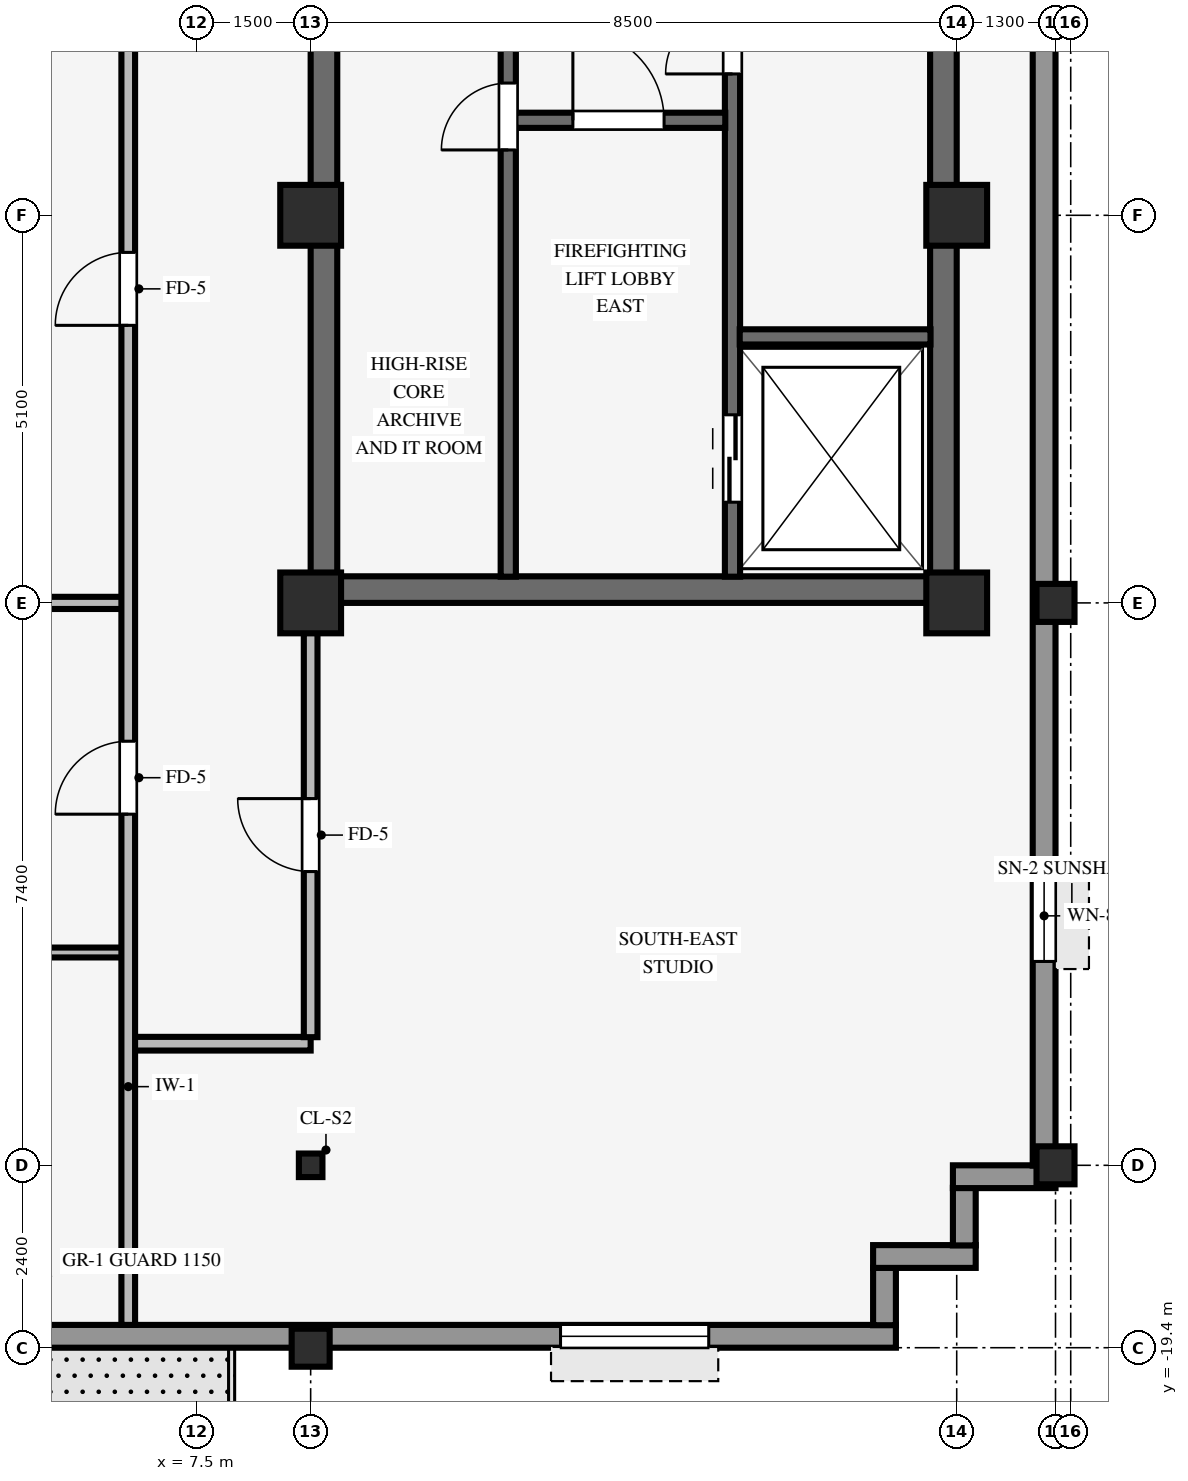
"""IFC4 building model, lengths in metres.
Left out: names, types, materials, properties, quantities, classifications, styles, units other than length and angle.
Written with IfcOpenShell. Run it as: python <this file> out.ifc"""

import sys

from ifc_helpers import new_model, si_unit, direction, frame, frame_2d, origin, origin_2d, place, context, subcontext, project, spatial, rectangle, hollow_rectangle, i_section, extrude, source, transform, mapped, element, fill, save


model = new_model("IFC4")
c1 = context("Model", 3, precision=1e-05, world=origin(), true_north=direction((0.0, 1.0)))
c2 = subcontext(c1, "Body", "Model", "MODEL_VIEW")
j1 = project(units=[si_unit("LENGTHUNIT", "METRE"), si_unit("PLANEANGLEUNIT", "RADIAN")], contexts=[c1])
p1 = place(None, origin())
s1 = spatial("IfcSite", under=j1, at=p1, CompositionType="ELEMENT")
p2 = place(p1, origin())
s2 = spatial("IfcBuilding", under=s1, at=p2, CompositionType="ELEMENT")
p3 = place(p2, frame((0.0, 0.0, 231.05)))
s3 = spatial("IfcBuildingStorey", under=s2, at=p3, CompositionType="ELEMENT", Elevation=231.05)
p4 = place(p3, frame((9.0, -9.425, 0.0), z_axis=(0.0, 0.0, 1.0), x_axis=(1.0, 0.0, 0.0)))
e1 = element("IfcWall", 1, at=p4, inside=s3, PredefinedType="SHEAR", context=c2, shape_type="SweptSolid", body=[
    extrude(rectangle(XDim=8.5, YDim=0.35, at=frame_2d((4.25, 0.0))), origin(), (0.0, 0.0, 1.0), 3.37),
])
p5 = place(p3, frame((9.175, -9.255, 0.0), z_axis=(0.0, 0.0, 1.0), x_axis=(0.0, 1.0, 0.0)))
e2 = element("IfcWall", 2, at=p5, inside=s3, PredefinedType="SHEAR", context=c2, shape_type="SweptSolid", body=[
    extrude(rectangle(XDim=18.51, YDim=0.35, at=frame_2d((9.255, 0.0))), origin(), (0.0, 0.0, 1.0), 3.37),
])
p6 = place(p5, frame((8.655, 0.0, 0.0)))
e3 = element("IfcOpeningElement", 3, at=p6, cuts=e2, PredefinedType="OPENING", context=c2, shape_type="SweptSolid", body=[
    extrude(rectangle(XDim=1.2, YDim=2.15, at=frame_2d((0.6, 1.075))), frame((0.0, 0.185, 0.0), z_axis=(0.0, -1.0, 0.0), x_axis=(1.0, 0.0, 0.0)), (0.0, 0.0, 1.0), 0.37),
])
p7 = place(p3, frame((17.325, -9.255, 0.0), z_axis=(0.0, 0.0, 1.0), x_axis=(0.0, 1.0, 0.0)))
e4 = element("IfcWall", 4, at=p7, inside=s3, PredefinedType="SHEAR", context=c2, shape_type="SweptSolid", body=[
    extrude(rectangle(XDim=18.51, YDim=0.35, at=frame_2d((9.255, 0.0))), origin(), (0.0, 0.0, 1.0), 3.37),
])
for number, where, z_axis, x_axis in (
    (5, (9.0, -9.6, 0.0), (0.0, 0.0, 1.0), (1.0, 0.0, 0.0)),
    (6, (9.0, -4.5, 0.0), (0.0, 0.0, 1.0), (1.0, 0.0, 0.0)),
    (7, (17.5, -9.6, 0.0), (0.0, 0.0, 1.0), (1.0, 0.0, 0.0)),
    (8, (17.5, -4.5, 0.0), (0.0, 0.0, 1.0), (1.0, 0.0, 0.0)),
):
    element("IfcColumn", number, at=place(p3, frame(where, z_axis=z_axis, x_axis=x_axis)), inside=s3, PredefinedType="COLUMN", context=c2, shape_type="SweptSolid", body=[
        extrude(rectangle(XDim=0.8, YDim=0.8, at=origin_2d()), origin(), (0.0, 0.0, 1.0), 3.37),
    ])
for number, where, z_axis, x_axis in (
    (9, (18.8, -17.0, 0.0), (0.0, 0.0, 1.0), (1.0, 0.0, 0.0)),
    (10, (18.8, -9.6, 0.0), (0.0, 0.0, 1.0), (1.0, 0.0, 0.0)),
    (11, (9.0, -19.4, 0.0), (0.0, 0.0, 1.0), (1.0, 0.0, 0.0)),
):
    element("IfcColumn", number, at=place(p3, frame(where, z_axis=z_axis, x_axis=x_axis)), inside=s3, PredefinedType="COLUMN", context=c2, shape_type="SweptSolid", body=[
        extrude(hollow_rectangle(XDim=0.5, YDim=0.5, WallThickness=0.032, InnerFilletRadius=0.032, OuterFilletRadius=0.064, at=origin_2d()), origin(), (0.0, 0.0, 1.0), 3.37),
    ])
p8 = place(p3, frame((9.0, -17.0, 0.0), z_axis=(0.0, 0.0, 1.0), x_axis=(1.0, 0.0, 0.0)))
e12 = element("IfcColumn", 12, at=p8, inside=s3, PredefinedType="COLUMN", context=c2, shape_type="SweptSolid", body=[
    extrude(i_section(OverallWidth=0.31, OverallDepth=0.31, WebThickness=0.015, FlangeThickness=0.015, FilletRadius=0.015, at=origin_2d()), origin(), (0.0, 0.0, 1.0), 3.37),
])
p9 = place(p3, frame((-24.3, -19.25, 0.0), z_axis=(0.0, 0.0, 1.0), x_axis=(1.0, 0.0, 0.0)))
e13 = element("IfcWall", 13, at=p9, inside=s3, PredefinedType="STANDARD", context=c2, shape_type="SweptSolid", body=[
    extrude(rectangle(XDim=41.0, YDim=0.3, at=frame_2d((20.5, 0.0))), origin(), (0.0, 0.0, 1.0), 2.705),
])
p10 = place(p9, frame((29.55, 0.0, 0.0), z_axis=(0.0, 0.0, 1.0), x_axis=(-1.0, 0.0, 0.0)))
e14 = element("IfcOpeningElement", 14, at=p10, cuts=e13, PredefinedType="OPENING", context=c2, shape_type="SweptSolid", body=[
    extrude(rectangle(XDim=1.05, YDim=2.1, at=frame_2d((0.525, 1.05))), frame((0.0, 0.16, 0.0), z_axis=(0.0, -1.0, 0.0), x_axis=(1.0, 0.0, 0.0)), (0.0, 0.0, 1.0), 0.32),
])
p11 = place(p9, frame((2.462, 0.0, 0.8)))
e15 = element("IfcOpeningElement", 15, at=p11, cuts=e13, PredefinedType="OPENING", context=c2, shape_type="SweptSolid", body=[
    extrude(rectangle(XDim=1.95, YDim=1.48, at=frame_2d((0.975, 0.74))), frame((0.0, 0.16, 0.0), z_axis=(0.0, -1.0, 0.0), x_axis=(1.0, 0.0, 0.0)), (0.0, 0.0, 1.0), 0.32),
])
p12 = place(p9, frame((7.788, 0.0, 0.8)))
e16 = element("IfcOpeningElement", 16, at=p12, cuts=e13, PredefinedType="OPENING", context=c2, shape_type="SweptSolid", body=[
    extrude(rectangle(XDim=1.95, YDim=1.48, at=frame_2d((0.975, 0.74))), frame((0.0, 0.16, 0.0), z_axis=(0.0, -1.0, 0.0), x_axis=(1.0, 0.0, 0.0)), (0.0, 0.0, 1.0), 0.32),
])
p13 = place(p9, frame((12.212, 0.0, 0.8)))
e17 = element("IfcOpeningElement", 17, at=p13, cuts=e13, PredefinedType="OPENING", context=c2, shape_type="SweptSolid", body=[
    extrude(rectangle(XDim=1.95, YDim=1.48, at=frame_2d((0.975, 0.74))), frame((0.0, 0.16, 0.0), z_axis=(0.0, -1.0, 0.0), x_axis=(1.0, 0.0, 0.0)), (0.0, 0.0, 1.0), 0.32),
])
p14 = place(p9, frame((17.988, 0.0, 0.8)))
e18 = element("IfcOpeningElement", 18, at=p14, cuts=e13, PredefinedType="OPENING", context=c2, shape_type="SweptSolid", body=[
    extrude(rectangle(XDim=1.95, YDim=1.48, at=frame_2d((0.975, 0.74))), frame((0.0, 0.16, 0.0), z_axis=(0.0, -1.0, 0.0), x_axis=(1.0, 0.0, 0.0)), (0.0, 0.0, 1.0), 0.32),
])
p15 = place(p9, frame((21.512, 0.0, 0.8)))
e19 = element("IfcOpeningElement", 19, at=p15, cuts=e13, PredefinedType="OPENING", context=c2, shape_type="SweptSolid", body=[
    extrude(rectangle(XDim=1.95, YDim=1.48, at=frame_2d((0.975, 0.74))), frame((0.0, 0.16, 0.0), z_axis=(0.0, -1.0, 0.0), x_axis=(1.0, 0.0, 0.0)), (0.0, 0.0, 1.0), 0.32),
])
p16 = place(p9, frame((25.938, 0.0, 0.8)))
e20 = element("IfcOpeningElement", 20, at=p16, cuts=e13, PredefinedType="OPENING", context=c2, shape_type="SweptSolid", body=[
    extrude(rectangle(XDim=1.95, YDim=1.48, at=frame_2d((0.975, 0.74))), frame((0.0, 0.16, 0.0), z_axis=(0.0, -1.0, 0.0), x_axis=(1.0, 0.0, 0.0)), (0.0, 0.0, 1.0), 0.32),
])
p17 = place(p9, frame((36.587, 0.0, 0.8)))
e21 = element("IfcOpeningElement", 21, at=p17, cuts=e13, PredefinedType="OPENING", context=c2, shape_type="SweptSolid", body=[
    extrude(rectangle(XDim=1.95, YDim=1.48, at=frame_2d((0.975, 0.74))), frame((0.0, 0.16, 0.0), z_axis=(0.0, -1.0, 0.0), x_axis=(1.0, 0.0, 0.0)), (0.0, 0.0, 1.0), 0.32),
])
p18 = place(p3, frame((16.55, -19.104, 0.0), z_axis=(0.0, 0.0, 1.0), x_axis=(0.0, 1.0, 0.0)))
e22 = element("IfcWall", 22, at=p18, inside=s3, PredefinedType="STANDARD", context=c2, shape_type="SweptSolid", body=[
    extrude(rectangle(XDim=0.758, YDim=0.3, at=frame_2d((0.379, 0.0))), origin(), (0.0, 0.0, 1.0), 2.892),
])
p19 = place(p3, frame((16.4, -18.2, 0.0), z_axis=(0.0, 0.0, 1.0), x_axis=(1.0, 0.0, 0.0)))
e23 = element("IfcWall", 23, at=p19, inside=s3, PredefinedType="STANDARD", context=c2, shape_type="SweptSolid", body=[
    extrude(rectangle(XDim=1.35, YDim=0.3, at=frame_2d((0.675, 0.0))), origin(), (0.0, 0.0, 1.0), 2.892),
])
p20 = place(p3, frame((17.6, -18.054, 0.0), z_axis=(0.0, 0.0, 1.0), x_axis=(0.0, 1.0, 0.0)))
e24 = element("IfcWall", 24, at=p20, inside=s3, PredefinedType="STANDARD", context=c2, shape_type="SweptSolid", body=[
    extrude(rectangle(XDim=0.758, YDim=0.3, at=frame_2d((0.379, 0.0))), origin(), (0.0, 0.0, 1.0), 2.892),
])
p21 = place(p3, frame((17.45, -17.15, 0.0), z_axis=(0.0, 0.0, 1.0), x_axis=(1.0, 0.0, 0.0)))
e25 = element("IfcWall", 25, at=p21, inside=s3, PredefinedType="STANDARD", context=c2, shape_type="SweptSolid", body=[
    extrude(rectangle(XDim=1.35, YDim=0.3, at=frame_2d((0.675, 0.0))), origin(), (0.0, 0.0, 1.0), 2.892),
])
p22 = place(p3, frame((18.65, -17.004, 0.0), z_axis=(0.0, 0.0, 1.0), x_axis=(0.0, 1.0, 0.0)))
e26 = element("IfcWall", 26, at=p22, inside=s3, PredefinedType="STANDARD", context=c2, shape_type="SweptSolid", body=[
    extrude(rectangle(XDim=34.008, YDim=0.3, at=frame_2d((17.004, 0.0))), origin(), (0.0, 0.0, 1.0), 2.705),
])
p23 = place(p22, frame((2.686, 0.0, 0.8)))
e27 = element("IfcOpeningElement", 27, at=p23, cuts=e26, PredefinedType="OPENING", context=c2, shape_type="SweptSolid", body=[
    extrude(rectangle(XDim=1.2, YDim=1.48, at=frame_2d((0.6, 0.74))), frame((0.0, 0.16, 0.0), z_axis=(0.0, -1.0, 0.0), x_axis=(1.0, 0.0, 0.0)), (0.0, 0.0, 1.0), 0.32),
])
p24 = place(p22, frame((30.122, 0.0, 0.8)))
e28 = element("IfcOpeningElement", 28, at=p24, cuts=e26, PredefinedType="OPENING", context=c2, shape_type="SweptSolid", body=[
    extrude(rectangle(XDim=1.2, YDim=1.48, at=frame_2d((0.6, 0.74))), frame((0.0, 0.16, 0.0), z_axis=(0.0, -1.0, 0.0), x_axis=(1.0, 0.0, 0.0)), (0.0, 0.0, 1.0), 0.32),
])
p25 = place(p3, frame((14.55, -9.255, 0.0), z_axis=(0.0, 0.0, 1.0), x_axis=(0.0, 1.0, 0.0)))
e29 = element("IfcWall", 29, at=p25, inside=s3, PredefinedType="SHEAR", context=c2, shape_type="SweptSolid", body=[
    extrude(rectangle(XDim=10.16, YDim=0.2, at=frame_2d((5.08, 0.0))), origin(), (0.0, 0.0, 1.0), 3.37),
])
p26 = place(p25, frame((6.615, 0.0, 0.0)))
e30 = element("IfcOpeningElement", 30, at=p26, cuts=e29, PredefinedType="OPENING", context=c2, shape_type="SweptSolid", body=[
    extrude(rectangle(XDim=0.88, YDim=2.1, at=frame_2d((0.44, 1.05))), frame((0.0, 0.11, 0.0), z_axis=(0.0, -1.0, 0.0), x_axis=(1.0, 0.0, 0.0)), (0.0, 0.0, 1.0), 0.22),
])
p27 = place(p25, frame((0.98, 0.0, 0.0)))
e31 = element("IfcOpeningElement", 31, at=p27, cuts=e29, PredefinedType="OPENING", context=c2, shape_type="SweptSolid", body=[
    extrude(rectangle(XDim=1.15, YDim=2.15, at=frame_2d((0.575, 1.075))), frame((0.0, 0.11, 0.0), z_axis=(0.0, -1.0, 0.0), x_axis=(1.0, 0.0, 0.0)), (0.0, 0.0, 1.0), 0.22),
])
p28 = place(p3, frame((14.645, -6.1, 0.0), z_axis=(0.0, 0.0, 1.0), x_axis=(1.0, 0.0, 0.0)))
e32 = element("IfcWall", 32, at=p28, inside=s3, PredefinedType="SHEAR", context=c2, shape_type="SweptSolid", body=[
    extrude(rectangle(XDim=2.51, YDim=0.2, at=frame_2d((1.255, 0.0))), origin(), (0.0, 0.0, 1.0), 3.37),
])
p29 = place(p3, frame((11.6, -9.255, 0.0), z_axis=(0.0, 0.0, 1.0), x_axis=(0.0, 1.0, 0.0)))
e33 = element("IfcWall", 33, at=p29, inside=s3, PredefinedType="SHEAR", context=c2, shape_type="SweptSolid", body=[
    extrude(rectangle(XDim=8.025, YDim=0.2, at=frame_2d((4.012, 0.0))), origin(), (0.0, 0.0, 1.0), 3.37),
])
p30 = place(p29, frame((5.615, 0.0, 0.0)))
e34 = element("IfcOpeningElement", 34, at=p30, cuts=e33, PredefinedType="OPENING", context=c2, shape_type="SweptSolid", body=[
    extrude(rectangle(XDim=0.88, YDim=2.1, at=frame_2d((0.44, 1.05))), frame((0.0, 0.11, 0.0), z_axis=(0.0, -1.0, 0.0), x_axis=(1.0, 0.0, 0.0)), (0.0, 0.0, 1.0), 0.22),
])
p31 = place(p3, frame((11.695, -3.25, 0.0), z_axis=(0.0, 0.0, 1.0), x_axis=(1.0, 0.0, 0.0)))
e35 = element("IfcWall", 35, at=p31, inside=s3, PredefinedType="SHEAR", context=c2, shape_type="SweptSolid", body=[
    extrude(rectangle(XDim=2.76, YDim=0.2, at=frame_2d((1.38, 0.0))), origin(), (0.0, 0.0, 1.0), 3.37),
])
p32 = place(p31, frame((0.755, 0.0, 0.0)))
e36 = element("IfcOpeningElement", 36, at=p32, cuts=e35, PredefinedType="OPENING", context=c2, shape_type="SweptSolid", body=[
    extrude(rectangle(XDim=1.2, YDim=2.15, at=frame_2d((0.6, 1.075))), frame((0.0, 0.11, 0.0), z_axis=(0.0, -1.0, 0.0), x_axis=(1.0, 0.0, 0.0)), (0.0, 0.0, 1.0), 0.22),
])
p33 = place(p3, frame((6.661, -15.4, 0.0), z_axis=(0.0, 0.0, 1.0), x_axis=(1.0, 0.0, 0.0)))
e37 = element("IfcWall", 37, at=p33, inside=s3, PredefinedType="PARTITIONING", context=c2, shape_type="SweptSolid", body=[
    extrude(rectangle(XDim=2.339, YDim=0.18, at=frame_2d((1.169, 0.0))), origin(), (0.0, 0.0, 1.0), 3.36),
])
p34 = place(p3, frame((-6.539, -14.2, 0.0), z_axis=(0.0, 0.0, 1.0), x_axis=(1.0, 0.0, 0.0)))
e38 = element("IfcWall", 38, at=p34, inside=s3, PredefinedType="PARTITIONING", context=c2, shape_type="SweptSolid", body=[
    extrude(rectangle(XDim=13.078, YDim=0.13, at=frame_2d((6.539, 0.0))), origin(), (0.0, 0.0, 1.0), 3.36),
])
p35 = place(p3, frame((0.151, -9.6, 0.0), z_axis=(0.0, 0.0, 1.0), x_axis=(1.0, 0.0, 0.0)))
e39 = element("IfcWall", 39, at=p35, inside=s3, PredefinedType="PARTITIONING", context=c2, shape_type="SweptSolid", body=[
    extrude(rectangle(XDim=6.388, YDim=0.16, at=frame_2d((3.194, 0.0))), origin(), (0.0, 0.0, 1.0), 2.405),
])
p36 = place(p3, frame((6.6, -19.1, 0.0), z_axis=(0.0, 0.0, 1.0), x_axis=(0.0, 1.0, 0.0)))
e40 = element("IfcWall", 40, at=p36, inside=s3, PredefinedType="PARTITIONING", context=c2, shape_type="SweptSolid", body=[
    extrude(rectangle(XDim=17.764, YDim=0.18, at=frame_2d((8.882, 0.0))), origin(), (0.0, 0.0, 1.0), 3.36),
])
p37 = place(p36, frame((13.152, 0.0, 0.0)))
e41 = element("IfcOpeningElement", 41, at=p37, cuts=e40, PredefinedType="OPENING", context=c2, shape_type="SweptSolid", body=[
    extrude(rectangle(XDim=0.96, YDim=2.1, at=frame_2d((0.48, 1.05))), frame((0.0, 0.1, 0.0), z_axis=(0.0, -1.0, 0.0), x_axis=(1.0, 0.0, 0.0)), (0.0, 0.0, 1.0), 0.2),
])
p38 = place(p36, frame((6.72, 0.0, 0.0)))
e42 = element("IfcOpeningElement", 42, at=p38, cuts=e40, PredefinedType="OPENING", context=c2, shape_type="SweptSolid", body=[
    extrude(rectangle(XDim=0.96, YDim=2.1, at=frame_2d((0.48, 1.05))), frame((0.0, 0.1, 0.0), z_axis=(0.0, -1.0, 0.0), x_axis=(1.0, 0.0, 0.0)), (0.0, 0.0, 1.0), 0.2),
])
p39 = place(p3, frame((9.0, -15.314, 0.0), z_axis=(0.0, 0.0, 1.0), x_axis=(0.0, 1.0, 0.0)))
e43 = element("IfcWall", 43, at=p39, inside=s3, PredefinedType="PARTITIONING", context=c2, shape_type="SweptSolid", body=[
    extrude(rectangle(XDim=5.318, YDim=0.18, at=frame_2d((2.659, 0.0))), origin(), (0.0, 0.0, 1.0), 2.892),
])
p40 = place(p39, frame((2.179, 0.0, 0.0)))
e44 = element("IfcOpeningElement", 44, at=p40, cuts=e43, PredefinedType="OPENING", context=c2, shape_type="SweptSolid", body=[
    extrude(rectangle(XDim=0.96, YDim=2.1, at=frame_2d((0.48, 1.05))), frame((0.0, 0.1, 0.0), z_axis=(0.0, -1.0, 0.0), x_axis=(1.0, 0.0, 0.0)), (0.0, 0.0, 1.0), 0.2),
])
m1 = source(origin(), c2, "Body", "SweptSolid", [
    extrude(rectangle(XDim=1.95, YDim=1.48, at=frame_2d((0.975, 0.74))), frame((0.0, 0.03, 0.0), z_axis=(0.0, -1.0, 0.0), x_axis=(1.0, 0.0, 0.0)), (0.0, 0.0, 1.0), 0.06),
])
p41 = place(p17, origin())
e45 = element("IfcWindow", 45, at=p41, inside=s3, PartitioningType="SINGLE_PANEL", PredefinedType="WINDOW", context=c2, shape_type="MappedRepresentation", body=[
    mapped(m1, transform((0.0, 0.0, 0.0), scale=1.0)),
])
fill(e21, e45)
m2 = source(origin(), c2, "Body", "SweptSolid", [
    extrude(rectangle(XDim=1.2, YDim=1.48, at=frame_2d((0.6, 0.74))), frame((0.0, 0.03, 0.0), z_axis=(0.0, -1.0, 0.0), x_axis=(1.0, 0.0, 0.0)), (0.0, 0.0, 1.0), 0.06),
])
p42 = place(p23, origin())
e46 = element("IfcWindow", 46, at=p42, inside=s3, PartitioningType="SINGLE_PANEL", PredefinedType="WINDOW", context=c2, shape_type="MappedRepresentation", body=[
    mapped(m2, transform((0.0, 0.0, 0.0), scale=1.0)),
])
fill(e27, e46)
m3 = source(origin(), c2, "Body", "SweptSolid", [
    extrude(rectangle(XDim=0.88, YDim=2.1, at=frame_2d((0.44, 1.05))), frame((0.0, 0.025, 0.0), z_axis=(0.0, -1.0, 0.0), x_axis=(1.0, 0.0, 0.0)), (0.0, 0.0, 1.0), 0.05),
])
p43 = place(p26, origin())
e47 = element("IfcDoor", 47, at=p43, inside=s3, OperationType="SINGLE_SWING_LEFT", PredefinedType="DOOR", context=c2, shape_type="MappedRepresentation", body=[
    mapped(m3, transform((0.0, 0.0, 0.0), scale=1.0)),
])
fill(e30, e47)
m4 = source(origin(), c2, "Body", "SweptSolid", [
    extrude(rectangle(XDim=1.2, YDim=2.15, at=frame_2d((0.6, 1.075))), frame((0.0, 0.025, 0.0), z_axis=(0.0, -1.0, 0.0), x_axis=(1.0, 0.0, 0.0)), (0.0, 0.0, 1.0), 0.05),
])
p44 = place(p32, origin())
e48 = element("IfcDoor", 48, at=p44, inside=s3, OperationType="SINGLE_SWING_LEFT", PredefinedType="DOOR", context=c2, shape_type="MappedRepresentation", body=[
    mapped(m4, transform((0.0, 0.0, 0.0), scale=1.0)),
])
fill(e36, e48)
p45 = place(p30, origin())
e49 = element("IfcDoor", 49, at=p45, inside=s3, OperationType="SINGLE_SWING_LEFT", PredefinedType="DOOR", context=c2, shape_type="MappedRepresentation", body=[
    mapped(m3, transform((0.0, 0.0, 0.0), scale=1.0)),
])
fill(e34, e49)
m5 = source(origin(), c2, "Body", "SweptSolid", [
    extrude(rectangle(XDim=1.15, YDim=2.15, at=frame_2d((0.575, 1.075))), frame((0.0, 0.025, 0.0), z_axis=(0.0, -1.0, 0.0), x_axis=(1.0, 0.0, 0.0)), (0.0, 0.0, 1.0), 0.05),
])
p46 = place(p27, origin())
e50 = element("IfcDoor", 50, at=p46, inside=s3, OperationType="DOUBLE_DOOR_SLIDING", PredefinedType="DOOR", context=c2, shape_type="MappedRepresentation", body=[
    mapped(m5, transform((0.0, 0.0, 0.0), scale=1.0)),
])
fill(e31, e50)
m6 = source(origin(), c2, "Body", "SweptSolid", [
    extrude(rectangle(XDim=0.96, YDim=2.1, at=frame_2d((0.48, 1.05))), frame((0.0, 0.025, 0.0), z_axis=(0.0, -1.0, 0.0), x_axis=(1.0, 0.0, 0.0)), (0.0, 0.0, 1.0), 0.05),
])
p47 = place(p37, origin())
e51 = element("IfcDoor", 51, at=p47, inside=s3, OperationType="SINGLE_SWING_LEFT", PredefinedType="DOOR", context=c2, shape_type="MappedRepresentation", body=[
    mapped(m6, transform((0.0, 0.0, 0.0), scale=1.0)),
])
fill(e41, e51)
p48 = place(p40, origin())
e52 = element("IfcDoor", 52, at=p48, inside=s3, OperationType="SINGLE_SWING_RIGHT", PredefinedType="DOOR", context=c2, shape_type="MappedRepresentation", body=[
    mapped(m6, transform((0.0, 0.0, 0.0), scale=1.0)),
])
fill(e44, e52)
p49 = place(p38, origin())
e53 = element("IfcDoor", 53, at=p49, inside=s3, OperationType="SINGLE_SWING_LEFT", PredefinedType="DOOR", context=c2, shape_type="MappedRepresentation", body=[
    mapped(m6, transform((0.0, 0.0, 0.0), scale=1.0)),
])
fill(e42, e53)
save(model, sys.argv[1])
